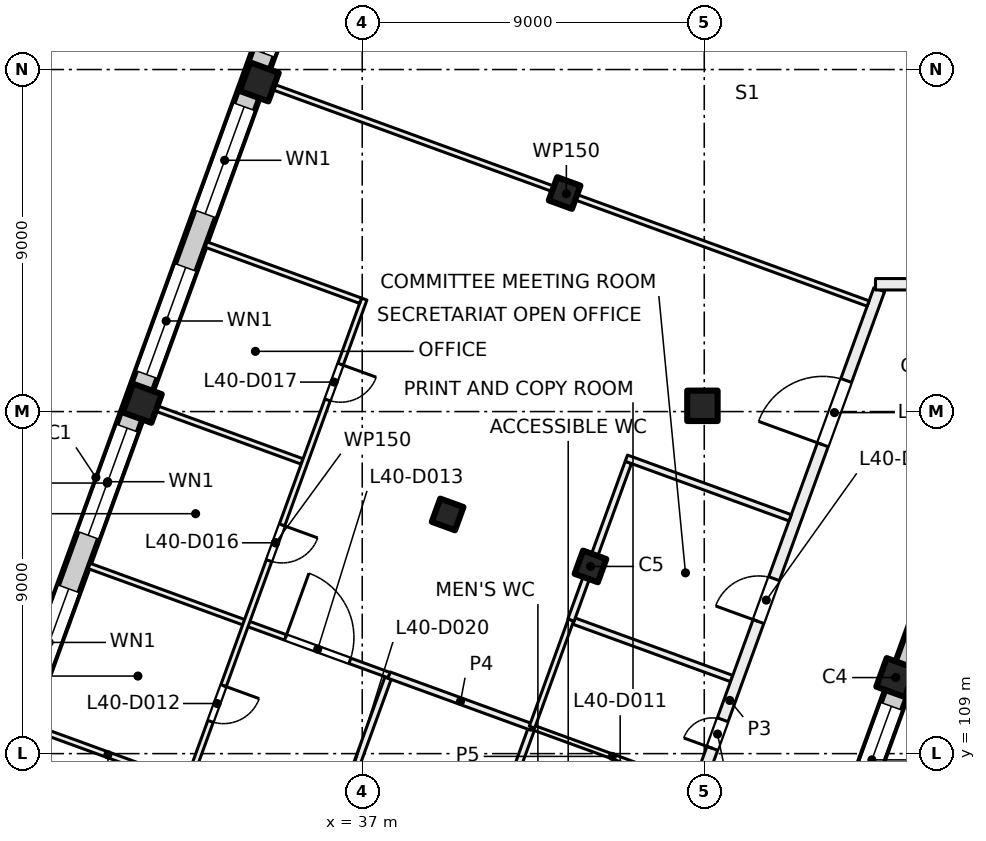
"""IFC4 building model, lengths in metres.
Left out: names, types, materials, properties, quantities, classifications, styles, units other than length and angle.
Written with IfcOpenShell. Run it as: python <this file> out.ifc"""

import sys

from ifc_helpers import new_model, si_unit, direction, frame, frame_2d, origin, origin_2d, place, context, subcontext, project, spatial, rectangle, extrude, element, fill, save


model = new_model("IFC4")
c1 = context("Model", 3, precision=1e-05, world=origin(), true_north=direction((0.0, 1.0)))
c2 = subcontext(c1, "Body", "Model", "MODEL_VIEW")
j1 = project(units=[si_unit("LENGTHUNIT", "METRE"), si_unit("PLANEANGLEUNIT", "RADIAN")], contexts=[c1])
p1 = place(None, origin())
s1 = spatial("IfcSite", under=j1, at=p1, CompositionType="ELEMENT")
p2 = place(p1, origin())
s2 = spatial("IfcBuilding", under=s1, at=p2, CompositionType="ELEMENT")
p3 = place(p2, frame((0.0, 0.0, 170.5)))
s3 = spatial("IfcBuildingStorey", under=s2, at=p3, CompositionType="ELEMENT", Elevation=170.5)
p4 = place(p3, frame((45.952, 118.152, 0.0), z_axis=(0.0, 0.0, 1.0), x_axis=(1.0, 0.0, 0.0)))
e1 = element("IfcColumn", 1, at=p4, inside=s3, PredefinedType="COLUMN", context=c2, shape_type="SweptSolid", body=[
    extrude(rectangle(XDim=0.8, YDim=0.8, at=origin_2d()), origin(), (0.0, 0.0, 1.0), 4.0),
])
for number, where, z_axis, x_axis in (
    (2, (43.006, 113.925, 0.0), (0.0, 0.0, 1.0), (-0.342, -0.94, 0.0)),
    (3, (42.325, 123.751, 0.0), (0.0, 0.0, 1.0), (-0.342, -0.94, 0.0)),
    (4, (39.247, 115.293, 0.0), (0.0, 0.0, 1.0), (-0.342, -0.94, 0.0)),
):
    element("IfcColumn", number, at=place(p3, frame(where, z_axis=z_axis, x_axis=x_axis)), inside=s3, PredefinedType="COLUMN", context=c2, shape_type="SweptSolid", body=[
        extrude(rectangle(XDim=0.65, YDim=0.65, at=origin_2d()), origin(), (0.0, 0.0, 1.0), 4.0),
    ])
for number, where, z_axis, x_axis in (
    (5, (51.04, 111.001, 0.0), (0.0, 0.0, 1.0), (-0.342, -0.94, 0.0)),
    (6, (34.291, 126.675, 0.0), (0.0, 0.0, 1.0), (-0.342, -0.94, 0.0)),
    (7, (31.212, 118.218, 0.0), (0.0, 0.0, 1.0), (-0.342, -0.94, 0.0)),
):
    element("IfcColumn", number, at=place(p3, frame(where, z_axis=z_axis, x_axis=x_axis)), inside=s3, PredefinedType="COLUMN", context=c2, shape_type="SweptSolid", body=[
        extrude(rectangle(XDim=0.8, YDim=0.8, at=origin_2d()), origin(), (0.0, 0.0, 1.0), 4.0),
    ])
p5 = place(p3, frame((52.212, 113.783, 0.0), z_axis=(0.0, 0.0, 1.0), x_axis=(-0.34202521188, -0.939690775968, 0.0)))
e8 = element("IfcWall", 8, at=p5, inside=s3, PredefinedType="SOLIDWALL", context=c2, shape_type="SweptSolid", body=[
    extrude(rectangle(XDim=21.745, YDim=0.6, at=frame_2d((10.873, 0.0))), origin(), (0.0, 0.0, 1.0), 3.625),
])
p6 = place(p5, frame((3.765, 0.0, 0.9)))
e9 = element("IfcOpeningElement", 9, at=p6, cuts=e8, PredefinedType="OPENING", context=c2, shape_type="SweptSolid", body=[
    extrude(rectangle(XDim=3.0, YDim=2.4, at=frame_2d((1.5, 1.2))), frame((0.0, 0.31, 0.0), z_axis=(0.0, -1.0, 0.0), x_axis=(1.0, 0.0, 0.0)), (0.0, 0.0, 1.0), 0.62),
])
p7 = place(p5, frame((8.265, 0.0, 0.9)))
e10 = element("IfcOpeningElement", 10, at=p7, cuts=e8, PredefinedType="OPENING", context=c2, shape_type="SweptSolid", body=[
    extrude(rectangle(XDim=3.0, YDim=2.4, at=frame_2d((1.5, 1.2))), frame((0.0, 0.31, 0.0), z_axis=(0.0, -1.0, 0.0), x_axis=(1.0, 0.0, 0.0)), (0.0, 0.0, 1.0), 0.62),
])
p8 = place(p5, frame((12.765, 0.0, 0.9)))
e11 = element("IfcOpeningElement", 11, at=p8, cuts=e8, PredefinedType="OPENING", context=c2, shape_type="SweptSolid", body=[
    extrude(rectangle(XDim=3.0, YDim=2.4, at=frame_2d((1.5, 1.2))), frame((0.0, 0.31, 0.0), z_axis=(0.0, -1.0, 0.0), x_axis=(1.0, 0.0, 0.0)), (0.0, 0.0, 1.0), 0.62),
])
p9 = place(p5, frame((17.265, 0.0, 0.9)))
e12 = element("IfcOpeningElement", 12, at=p9, cuts=e8, PredefinedType="OPENING", context=c2, shape_type="SweptSolid", body=[
    extrude(rectangle(XDim=3.0, YDim=2.4, at=frame_2d((1.5, 1.2))), frame((0.0, 0.31, 0.0), z_axis=(0.0, -1.0, 0.0), x_axis=(1.0, 0.0, 0.0)), (0.0, 0.0, 1.0), 0.62),
])
p10 = place(p3, frame((24.666, 100.669, 0.0), z_axis=(0.0, 0.0, 1.0), x_axis=(0.34201964167, 0.939692803373, 0.0)))
e13 = element("IfcWall", 13, at=p10, inside=s3, PredefinedType="SOLIDWALL", context=c2, shape_type="SweptSolid", body=[
    extrude(rectangle(XDim=32.884, YDim=0.6, at=frame_2d((16.442, 0.0))), origin(), (0.0, 0.0, 1.0), 3.625),
])
p11 = place(p10, frame((1.48, 0.0, 0.9)))
e14 = element("IfcOpeningElement", 14, at=p11, cuts=e13, PredefinedType="OPENING", context=c2, shape_type="SweptSolid", body=[
    extrude(rectangle(XDim=3.0, YDim=2.4, at=frame_2d((1.5, 1.2))), frame((0.0, 0.31, 0.0), z_axis=(0.0, -1.0, 0.0), x_axis=(1.0, 0.0, 0.0)), (0.0, 0.0, 1.0), 0.62),
])
p12 = place(p10, frame((5.98, 0.0, 0.9)))
e15 = element("IfcOpeningElement", 15, at=p12, cuts=e13, PredefinedType="OPENING", context=c2, shape_type="SweptSolid", body=[
    extrude(rectangle(XDim=3.0, YDim=2.4, at=frame_2d((1.5, 1.2))), frame((0.0, 0.31, 0.0), z_axis=(0.0, -1.0, 0.0), x_axis=(1.0, 0.0, 0.0)), (0.0, 0.0, 1.0), 0.62),
])
p13 = place(p10, frame((10.48, 0.0, 0.9)))
e16 = element("IfcOpeningElement", 16, at=p13, cuts=e13, PredefinedType="OPENING", context=c2, shape_type="SweptSolid", body=[
    extrude(rectangle(XDim=3.0, YDim=2.4, at=frame_2d((1.5, 1.2))), frame((0.0, 0.31, 0.0), z_axis=(0.0, -1.0, 0.0), x_axis=(1.0, 0.0, 0.0)), (0.0, 0.0, 1.0), 0.62),
])
p14 = place(p10, frame((14.98, 0.0, 0.9)))
e17 = element("IfcOpeningElement", 17, at=p14, cuts=e13, PredefinedType="OPENING", context=c2, shape_type="SweptSolid", body=[
    extrude(rectangle(XDim=3.0, YDim=2.4, at=frame_2d((1.5, 1.2))), frame((0.0, 0.31, 0.0), z_axis=(0.0, -1.0, 0.0), x_axis=(1.0, 0.0, 0.0)), (0.0, 0.0, 1.0), 0.62),
])
p15 = place(p10, frame((19.48, 0.0, 0.9)))
e18 = element("IfcOpeningElement", 18, at=p15, cuts=e13, PredefinedType="OPENING", context=c2, shape_type="SweptSolid", body=[
    extrude(rectangle(XDim=3.0, YDim=2.4, at=frame_2d((1.5, 1.2))), frame((0.0, 0.31, 0.0), z_axis=(0.0, -1.0, 0.0), x_axis=(1.0, 0.0, 0.0)), (0.0, 0.0, 1.0), 0.62),
])
p16 = place(p10, frame((23.98, 0.0, 0.9)))
e19 = element("IfcOpeningElement", 19, at=p16, cuts=e13, PredefinedType="OPENING", context=c2, shape_type="SweptSolid", body=[
    extrude(rectangle(XDim=3.0, YDim=2.4, at=frame_2d((1.5, 1.2))), frame((0.0, 0.31, 0.0), z_axis=(0.0, -1.0, 0.0), x_axis=(1.0, 0.0, 0.0)), (0.0, 0.0, 1.0), 0.62),
])
p17 = place(p10, frame((28.48, 0.0, 0.9)))
e20 = element("IfcOpeningElement", 20, at=p17, cuts=e13, PredefinedType="OPENING", context=c2, shape_type="SweptSolid", body=[
    extrude(rectangle(XDim=3.0, YDim=2.4, at=frame_2d((1.5, 1.2))), frame((0.0, 0.31, 0.0), z_axis=(0.0, -1.0, 0.0), x_axis=(1.0, 0.0, 0.0)), (0.0, 0.0, 1.0), 0.62),
])
p18 = place(p3, frame((29.814, 113.938, 0.0), z_axis=(0.0, 0.0, 1.0), x_axis=(0.939698351515, -0.342004397867, 0.0)))
e21 = element("IfcWall", 21, at=p18, inside=s3, PredefinedType="PARTITIONING", context=c2, shape_type="SweptSolid", body=[
    extrude(rectangle(XDim=8.401, YDim=0.15, at=frame_2d((4.2, 0.0))), origin(), (0.0, 0.0, 1.0), 3.625),
])
p19 = place(p18, frame((5.5, 0.0, 0.0)))
e22 = element("IfcOpeningElement", 22, at=p19, cuts=e21, PredefinedType="OPENING", context=c2, shape_type="SweptSolid", body=[
    extrude(rectangle(XDim=1.8, YDim=2.1, at=frame_2d((0.9, 1.05))), frame((0.0, 0.085, 0.0), z_axis=(0.0, -1.0, 0.0), x_axis=(1.0, 0.0, 0.0)), (0.0, 0.0, 1.0), 0.17),
])
p20 = place(p3, frame((31.353, 118.166, 0.0), z_axis=(0.0, 0.0, 1.0), x_axis=(0.939803311208, -0.341715870634, 0.0)))
e23 = element("IfcWall", 23, at=p20, inside=s3, PredefinedType="PARTITIONING", context=c2, shape_type="SweptSolid", body=[
    extrude(rectangle(XDim=4.325, YDim=0.15, at=frame_2d((2.163, 0.0))), origin(), (0.0, 0.0, 1.0), 3.625),
])
p21 = place(p3, frame((32.34, 108.23, 0.0), z_axis=(0.0, 0.0, 1.0), x_axis=(-0.939737385516, 0.341897128188, 0.0)))
e24 = element("IfcWall", 24, at=p21, inside=s3, PredefinedType="PARTITIONING", context=c2, shape_type="SweptSolid", body=[
    extrude(rectangle(XDim=4.326, YDim=0.15, at=frame_2d((2.163, 0.0))), origin(), (0.0, 0.0, 1.0), 3.625),
])
p22 = place(p3, frame((37.053, 120.96, 0.0), z_axis=(0.0, 0.0, 1.0), x_axis=(-0.342064742067, -0.939676386973, 0.0)))
e25 = element("IfcWall", 25, at=p22, inside=s3, PredefinedType="PARTITIONING", context=c2, shape_type="SweptSolid", body=[
    extrude(rectangle(XDim=13.649, YDim=0.15, at=frame_2d((6.825, 0.0))), origin(), (0.0, 0.0, 1.0), 3.625),
])
p23 = place(p22, frame((10.824, 0.0, 0.0)))
e26 = element("IfcOpeningElement", 26, at=p23, cuts=e25, PredefinedType="OPENING", context=c2, shape_type="SweptSolid", body=[
    extrude(rectangle(XDim=1.0, YDim=2.1, at=frame_2d((0.5, 1.05))), frame((0.0, 0.085, 0.0), z_axis=(0.0, -1.0, 0.0), x_axis=(1.0, 0.0, 0.0)), (0.0, 0.0, 1.0), 0.17),
])
p24 = place(p22, frame((6.324, 0.0, 0.0)))
e27 = element("IfcOpeningElement", 27, at=p24, cuts=e25, PredefinedType="OPENING", context=c2, shape_type="SweptSolid", body=[
    extrude(rectangle(XDim=1.0, YDim=2.1, at=frame_2d((0.5, 1.05))), frame((0.0, 0.085, 0.0), z_axis=(0.0, -1.0, 0.0), x_axis=(1.0, 0.0, 0.0)), (0.0, 0.0, 1.0), 0.17),
])
p25 = place(p22, frame((1.824, 0.0, 0.0)))
e28 = element("IfcOpeningElement", 28, at=p25, cuts=e25, PredefinedType="OPENING", context=c2, shape_type="SweptSolid", body=[
    extrude(rectangle(XDim=1.0, YDim=2.1, at=frame_2d((0.5, 1.05))), frame((0.0, 0.085, 0.0), z_axis=(0.0, -1.0, 0.0), x_axis=(1.0, 0.0, 0.0)), (0.0, 0.0, 1.0), 0.17),
])
p26 = place(p3, frame((32.892, 122.395, 0.0), z_axis=(0.0, 0.0, 1.0), x_axis=(0.93973078783, -0.341915262023, 0.0)))
e29 = element("IfcWall", 29, at=p26, inside=s3, PredefinedType="PARTITIONING", context=c2, shape_type="SweptSolid", body=[
    extrude(rectangle(XDim=4.326, YDim=0.15, at=frame_2d((2.163, 0.0))), origin(), (0.0, 0.0, 1.0), 3.625),
])
p27 = place(p3, frame((34.66, 102.689, 0.0), z_axis=(0.0, 0.0, 1.0), x_axis=(0.341951828534, 0.939717482524, 0.0)))
e30 = element("IfcWall", 30, at=p27, inside=s3, PredefinedType="PARTITIONING", context=c2, shape_type="SweptSolid", body=[
    extrude(rectangle(XDim=8.826, YDim=0.175, at=frame_2d((4.413, 0.0))), origin(), (0.0, 0.0, 1.0), 3.625),
])
p28 = place(p27, frame((4.813, 0.0, 0.0)))
e31 = element("IfcOpeningElement", 31, at=p28, cuts=e30, PredefinedType="OPENING", context=c2, shape_type="SweptSolid", body=[
    extrude(rectangle(XDim=1.2, YDim=2.1, at=frame_2d((0.6, 1.05))), frame((0.0, 0.097, 0.0), z_axis=(0.0, -1.0, 0.0), x_axis=(1.0, 0.0, 0.0)), (0.0, 0.0, 1.0), 0.195),
])
p29 = place(p3, frame((38.418, 101.322, 0.0), z_axis=(0.0, 0.0, 1.0), x_axis=(0.342101536507, 0.939662992099, 0.0)))
e32 = element("IfcWall", 32, at=p29, inside=s3, PredefinedType="PARTITIONING", context=c2, shape_type="SweptSolid", body=[
    extrude(rectangle(XDim=8.913, YDim=0.175, at=frame_2d((4.457, 0.0))), origin(), (0.0, 0.0, 1.0), 3.625),
])
p30 = place(p3, frame((41.467, 109.697, 0.0), z_axis=(0.0, 0.0, 1.0), x_axis=(-0.939713209288, 0.341963571582, 0.0)))
e33 = element("IfcWall", 33, at=p30, inside=s3, PredefinedType="PARTITIONING", context=c2, shape_type="SweptSolid", body=[
    extrude(rectangle(XDim=4.0, YDim=0.175, at=frame_2d((2.0, 0.0))), origin(), (0.0, 0.0, 1.0), 3.625),
])
p31 = place(p3, frame((41.467, 109.697, 0.0), z_axis=(0.0, 0.0, 1.0), x_axis=(0.939609529273, -0.342248349154, 0.0)))
e34 = element("IfcWall", 34, at=p31, inside=s3, PredefinedType="PARTITIONING", context=c2, shape_type="SweptSolid", body=[
    extrude(rectangle(XDim=4.5, YDim=0.125, at=frame_2d((2.25, 0.0))), origin(), (0.0, 0.0, 1.0), 3.625),
])
p32 = place(p3, frame((42.493, 112.516, 0.0), z_axis=(0.0, 0.0, 1.0), x_axis=(-0.341965219194, -0.939712609717, 0.0)))
e35 = element("IfcWall", 35, at=p32, inside=s3, PredefinedType="PARTITIONING", context=c2, shape_type="SweptSolid", body=[
    extrude(rectangle(XDim=3.0, YDim=0.15, at=frame_2d((1.5, 0.0))), origin(), (0.0, 0.0, 1.0), 3.625),
])
p33 = place(p3, frame((42.575, 112.486, 0.0), z_axis=(0.0, 0.0, 1.0), x_axis=(0.939620446327, -0.342218375959, 0.0)))
e36 = element("IfcWall", 36, at=p33, inside=s3, PredefinedType="PARTITIONING", context=c2, shape_type="SweptSolid", body=[
    extrude(rectangle(XDim=4.412, YDim=0.175, at=frame_2d((2.206, 0.0))), origin(), (0.0, 0.0, 1.0), 3.625),
])
p34 = place(p3, frame((42.737, 99.59, 0.0), z_axis=(0.0, 0.0, 1.0), x_axis=(0.341992703977, 0.939702607438, 0.0)))
e37 = element("IfcWall", 37, at=p34, inside=s3, PredefinedType="PARTITIONING", context=c2, shape_type="SweptSolid", body=[
    extrude(rectangle(XDim=23.006, YDim=0.3, at=frame_2d((11.503, 0.0))), origin(), (0.0, 0.0, 1.0), 3.625),
])
p35 = place(p34, frame((4.062, 0.0, 0.0)))
e38 = element("IfcOpeningElement", 38, at=p35, cuts=e37, PredefinedType="OPENING", context=c2, shape_type="SweptSolid", body=[
    extrude(rectangle(XDim=1.0, YDim=2.1, at=frame_2d((0.5, 1.05))), frame((0.0, 0.16, 0.0), z_axis=(0.0, -1.0, 0.0), x_axis=(1.0, 0.0, 0.0)), (0.0, 0.0, 1.0), 0.32),
])
p36 = place(p34, frame((10.162, 0.0, 0.0)))
e39 = element("IfcOpeningElement", 39, at=p36, cuts=e37, PredefinedType="OPENING", context=c2, shape_type="SweptSolid", body=[
    extrude(rectangle(XDim=0.8, YDim=2.1, at=frame_2d((0.4, 1.05))), frame((0.0, 0.16, 0.0), z_axis=(0.0, -1.0, 0.0), x_axis=(1.0, 0.0, 0.0)), (0.0, 0.0, 1.0), 0.32),
])
p37 = place(p34, frame((13.712, 0.0, 0.0)))
e40 = element("IfcOpeningElement", 40, at=p37, cuts=e37, PredefinedType="OPENING", context=c2, shape_type="SweptSolid", body=[
    extrude(rectangle(XDim=1.2, YDim=2.1, at=frame_2d((0.6, 1.05))), frame((0.0, 0.16, 0.0), z_axis=(0.0, -1.0, 0.0), x_axis=(1.0, 0.0, 0.0)), (0.0, 0.0, 1.0), 0.32),
])
p38 = place(p34, frame((18.662, 0.0, 0.0)))
e41 = element("IfcOpeningElement", 41, at=p38, cuts=e37, PredefinedType="OPENING", context=c2, shape_type="SweptSolid", body=[
    extrude(rectangle(XDim=1.8, YDim=2.1, at=frame_2d((0.9, 1.05))), frame((0.0, 0.16, 0.0), z_axis=(0.0, -1.0, 0.0), x_axis=(1.0, 0.0, 0.0)), (0.0, 0.0, 1.0), 0.32),
])
p39 = place(p3, frame((44.002, 116.662, 0.0), z_axis=(0.0, 0.0, 1.0), x_axis=(-0.342022951975, -0.939691598517, 0.0)))
e42 = element("IfcWall", 42, at=p39, inside=s3, PredefinedType="PARTITIONING", context=c2, shape_type="SweptSolid", body=[
    extrude(rectangle(XDim=4.412, YDim=0.175, at=frame_2d((2.206, 0.0))), origin(), (0.0, 0.0, 1.0), 3.625),
])
p40 = place(p3, frame((48.26, 115.205, 0.0), z_axis=(0.0, 0.0, 1.0), x_axis=(-0.939684589011, 0.34204220964, 0.0)))
e43 = element("IfcWall", 43, at=p40, inside=s3, PredefinedType="PARTITIONING", context=c2, shape_type="SweptSolid", body=[
    extrude(rectangle(XDim=4.587, YDim=0.175, at=frame_2d((2.293, 0.0))), origin(), (0.0, 0.0, 1.0), 3.625),
])
p41 = place(p3, frame((50.311, 120.843, 0.0), z_axis=(0.0, 0.0, 1.0), x_axis=(-0.939664702396, 0.342096838733, 0.0)))
e44 = element("IfcWall", 44, at=p41, inside=s3, PredefinedType="PARTITIONING", context=c2, shape_type="SweptSolid", body=[
    extrude(rectangle(XDim=16.899, YDim=0.15, at=frame_2d((8.449, 0.0))), origin(), (0.0, 0.0, 1.0), 3.625),
])
p42 = place(p3, frame((50.506, 121.35, 0.0), z_axis=(0.0, 0.0, 1.0), x_axis=(1.0, 0.0, 0.0)))
e45 = element("IfcWall", 45, at=p42, inside=s3, PredefinedType="PARTITIONING", context=c2, shape_type="SweptSolid", body=[
    extrude(rectangle(XDim=35.319, YDim=0.3, at=frame_2d((17.659, 0.0))), origin(), (0.0, 0.0, 1.0), 3.625),
])
p43 = place(p42, frame((13.844, 0.0, 0.0)))
e46 = element("IfcOpeningElement", 46, at=p43, cuts=e45, PredefinedType="OPENING", context=c2, shape_type="SweptSolid", body=[
    extrude(rectangle(XDim=0.8, YDim=2.1, at=frame_2d((0.4, 1.05))), frame((0.0, 0.16, 0.0), z_axis=(0.0, -1.0, 0.0), x_axis=(1.0, 0.0, 0.0)), (0.0, 0.0, 1.0), 0.32),
])
p44 = place(p42, frame((9.144, 0.0, 0.0)))
e47 = element("IfcOpeningElement", 47, at=p44, cuts=e45, PredefinedType="OPENING", context=c2, shape_type="SweptSolid", body=[
    extrude(rectangle(XDim=1.2, YDim=2.1, at=frame_2d((0.6, 1.05))), frame((0.0, 0.16, 0.0), z_axis=(0.0, -1.0, 0.0), x_axis=(1.0, 0.0, 0.0)), (0.0, 0.0, 1.0), 0.32),
])
p45 = place(p42, frame((24.594, 0.0, 0.0)))
e48 = element("IfcOpeningElement", 48, at=p45, cuts=e45, PredefinedType="OPENING", context=c2, shape_type="SweptSolid", body=[
    extrude(rectangle(XDim=1.8, YDim=2.1, at=frame_2d((0.9, 1.05))), frame((0.0, 0.16, 0.0), z_axis=(0.0, -1.0, 0.0), x_axis=(1.0, 0.0, 0.0)), (0.0, 0.0, 1.0), 0.32),
])
p46 = place(p42, frame((2.543, 0.0, 0.0)))
e49 = element("IfcOpeningElement", 49, at=p46, cuts=e45, PredefinedType="OPENING", context=c2, shape_type="SweptSolid", body=[
    extrude(rectangle(XDim=1.8, YDim=2.1, at=frame_2d((0.9, 1.05))), frame((0.0, 0.16, 0.0), z_axis=(0.0, -1.0, 0.0), x_axis=(1.0, 0.0, 0.0)), (0.0, 0.0, 1.0), 0.32),
])
p47 = place(p6, origin())
e50 = element("IfcWindow", 50, at=p47, inside=s3, PartitioningType="SINGLE_PANEL", PredefinedType="WINDOW", context=c2, shape_type="SweptSolid", body=[
    extrude(rectangle(XDim=3.0, YDim=2.4, at=frame_2d((1.5, 1.2))), frame((0.0, 0.03, 0.0), z_axis=(0.0, -1.0, 0.0), x_axis=(1.0, 0.0, 0.0)), (0.0, 0.0, 1.0), 0.06),
])
fill(e9, e50)
p48 = place(p13, origin())
e51 = element("IfcWindow", 51, at=p48, inside=s3, PartitioningType="SINGLE_PANEL", PredefinedType="WINDOW", context=c2, shape_type="SweptSolid", body=[
    extrude(rectangle(XDim=3.0, YDim=2.4, at=frame_2d((1.5, 1.2))), frame((0.0, 0.03, 0.0), z_axis=(0.0, -1.0, 0.0), x_axis=(1.0, 0.0, 0.0)), (0.0, 0.0, 1.0), 0.06),
])
fill(e16, e51)
p49 = place(p14, origin())
e52 = element("IfcWindow", 52, at=p49, inside=s3, PartitioningType="SINGLE_PANEL", PredefinedType="WINDOW", context=c2, shape_type="SweptSolid", body=[
    extrude(rectangle(XDim=3.0, YDim=2.4, at=frame_2d((1.5, 1.2))), frame((0.0, 0.03, 0.0), z_axis=(0.0, -1.0, 0.0), x_axis=(1.0, 0.0, 0.0)), (0.0, 0.0, 1.0), 0.06),
])
fill(e17, e52)
p50 = place(p15, origin())
e53 = element("IfcWindow", 53, at=p50, inside=s3, PartitioningType="SINGLE_PANEL", PredefinedType="WINDOW", context=c2, shape_type="SweptSolid", body=[
    extrude(rectangle(XDim=3.0, YDim=2.4, at=frame_2d((1.5, 1.2))), frame((0.0, 0.03, 0.0), z_axis=(0.0, -1.0, 0.0), x_axis=(1.0, 0.0, 0.0)), (0.0, 0.0, 1.0), 0.06),
])
fill(e18, e53)
p51 = place(p16, origin())
e54 = element("IfcWindow", 54, at=p51, inside=s3, PartitioningType="SINGLE_PANEL", PredefinedType="WINDOW", context=c2, shape_type="SweptSolid", body=[
    extrude(rectangle(XDim=3.0, YDim=2.4, at=frame_2d((1.5, 1.2))), frame((0.0, 0.03, 0.0), z_axis=(0.0, -1.0, 0.0), x_axis=(1.0, 0.0, 0.0)), (0.0, 0.0, 1.0), 0.06),
])
fill(e19, e54)
p52 = place(p17, origin())
e55 = element("IfcWindow", 55, at=p52, inside=s3, PartitioningType="SINGLE_PANEL", PredefinedType="WINDOW", context=c2, shape_type="SweptSolid", body=[
    extrude(rectangle(XDim=3.0, YDim=2.4, at=frame_2d((1.5, 1.2))), frame((0.0, 0.03, 0.0), z_axis=(0.0, -1.0, 0.0), x_axis=(1.0, 0.0, 0.0)), (0.0, 0.0, 1.0), 0.06),
])
fill(e20, e55)
p53 = place(p23, origin())
e56 = element("IfcDoor", 56, at=p53, inside=s3, OperationType="SINGLE_SWING_LEFT", PredefinedType="DOOR", context=c2, shape_type="SweptSolid", body=[
    extrude(rectangle(XDim=1.0, YDim=2.1, at=frame_2d((0.5, 1.05))), frame((0.0, 0.025, 0.0), z_axis=(0.0, -1.0, 0.0), x_axis=(1.0, 0.0, 0.0)), (0.0, 0.0, 1.0), 0.05),
])
fill(e26, e56)
p54 = place(p19, origin())
e57 = element("IfcDoor", 57, at=p54, inside=s3, OperationType="DOUBLE_DOOR_SINGLE_SWING", PredefinedType="DOOR", context=c2, shape_type="SweptSolid", body=[
    extrude(rectangle(XDim=1.8, YDim=2.1, at=frame_2d((0.9, 1.05))), frame((0.0, 0.025, 0.0), z_axis=(0.0, -1.0, 0.0), x_axis=(1.0, 0.0, 0.0)), (0.0, 0.0, 1.0), 0.05),
])
fill(e22, e57)
p55 = place(p36, origin())
e58 = element("IfcDoor", 58, at=p55, inside=s3, OperationType="SINGLE_SWING_RIGHT", PredefinedType="DOOR", context=c2, shape_type="SweptSolid", body=[
    extrude(rectangle(XDim=0.8, YDim=2.1, at=frame_2d((0.4, 1.05))), frame((0.0, 0.025, 0.0), z_axis=(0.0, -1.0, 0.0), x_axis=(1.0, 0.0, 0.0)), (0.0, 0.0, 1.0), 0.05),
])
fill(e39, e58)
p56 = place(p37, origin())
e59 = element("IfcDoor", 59, at=p56, inside=s3, OperationType="DOUBLE_DOOR_SINGLE_SWING", PredefinedType="DOOR", context=c2, shape_type="SweptSolid", body=[
    extrude(rectangle(XDim=1.2, YDim=2.1, at=frame_2d((0.6, 1.05))), frame((0.0, 0.025, 0.0), z_axis=(0.0, -1.0, 0.0), x_axis=(1.0, 0.0, 0.0)), (0.0, 0.0, 1.0), 0.05),
])
fill(e40, e59)
p57 = place(p24, origin())
e60 = element("IfcDoor", 60, at=p57, inside=s3, OperationType="SINGLE_SWING_RIGHT", PredefinedType="DOOR", context=c2, shape_type="SweptSolid", body=[
    extrude(rectangle(XDim=1.0, YDim=2.1, at=frame_2d((0.5, 1.05))), frame((0.0, 0.025, 0.0), z_axis=(0.0, -1.0, 0.0), x_axis=(1.0, 0.0, 0.0)), (0.0, 0.0, 1.0), 0.05),
])
fill(e27, e60)
p58 = place(p25, origin())
e61 = element("IfcDoor", 61, at=p58, inside=s3, OperationType="SINGLE_SWING_LEFT", PredefinedType="DOOR", context=c2, shape_type="SweptSolid", body=[
    extrude(rectangle(XDim=1.0, YDim=2.1, at=frame_2d((0.5, 1.05))), frame((0.0, 0.025, 0.0), z_axis=(0.0, -1.0, 0.0), x_axis=(1.0, 0.0, 0.0)), (0.0, 0.0, 1.0), 0.05),
])
fill(e28, e61)
p59 = place(p38, origin())
e62 = element("IfcDoor", 62, at=p59, inside=s3, OperationType="DOUBLE_DOOR_SINGLE_SWING", PredefinedType="DOOR", context=c2, shape_type="SweptSolid", body=[
    extrude(rectangle(XDim=1.8, YDim=2.1, at=frame_2d((0.9, 1.05))), frame((0.0, 0.025, 0.0), z_axis=(0.0, -1.0, 0.0), x_axis=(1.0, 0.0, 0.0)), (0.0, 0.0, 1.0), 0.05),
])
fill(e41, e62)
save(model, sys.argv[1])
